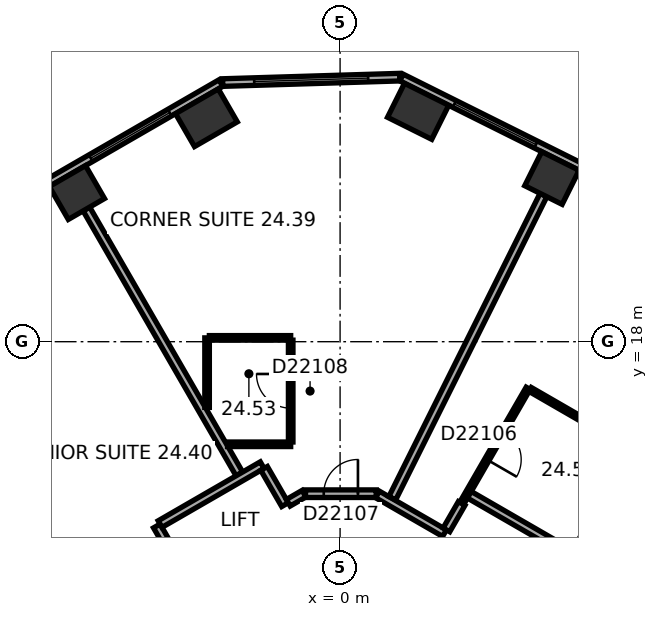
"""IFC4 building model, lengths in metres.
Left out: names, types, materials, properties, quantities, classifications, styles, units other than length and angle.
Written with IfcOpenShell. Run it as: python <this file> out.ifc"""

import sys

from ifc_helpers import new_model, si_unit, direction, frame, frame_2d, origin, origin_2d, place, context, subcontext, project, spatial, rectangle, extrude, element, fill, save


model = new_model("IFC4")
c1 = context("Model", 3, precision=1e-05, world=origin(), true_north=direction((0.0, 1.0)))
c2 = subcontext(c1, "Body", "Model", "MODEL_VIEW")
j1 = project(units=[si_unit("LENGTHUNIT", "METRE"), si_unit("PLANEANGLEUNIT", "RADIAN")], contexts=[c1])
p1 = place(None, origin())
s1 = spatial("IfcSite", under=j1, at=p1, CompositionType="ELEMENT")
p2 = place(p1, origin())
s2 = spatial("IfcBuilding", under=s1, at=p2, CompositionType="ELEMENT")
p3 = place(p2, frame((0.0, 0.0, 103.4)))
s3 = spatial("IfcBuildingStorey", under=s2, at=p3, CompositionType="ELEMENT", Elevation=103.4)
p4 = place(p3, frame((5.574, 22.306, 0.0), z_axis=(0.0, 0.0, 1.0), x_axis=(-0.894934361602, 0.44619781311, 0.0)))
e1 = element("IfcColumn", 1, at=p4, inside=s3, PredefinedType="COLUMN", context=c2, shape_type="SweptSolid", body=[
    extrude(rectangle(XDim=1.1, YDim=1.0, at=origin_2d()), origin(), (0.0, 0.0, 1.0), 3.3),
])
for number, where, z_axis, x_axis in (
    (2, (2.053, 24.062, 0.0), (0.0, 0.0, 1.0), (-0.895, 0.446, 0.0)),
    (3, (-3.518, 23.892, 0.0), (0.0, 0.0, 1.0), (-0.866, -0.5, 0.0)),
):
    element("IfcColumn", number, at=place(p3, frame(where, z_axis=z_axis, x_axis=x_axis)), inside=s3, PredefinedType="COLUMN", context=c2, shape_type="SweptSolid", body=[
        extrude(rectangle(XDim=1.3, YDim=1.0, at=origin_2d()), origin(), (0.0, 0.0, 1.0), 3.3),
    ])
p5 = place(p3, frame((-6.926, 21.925, 0.0), z_axis=(0.0, 0.0, 1.0), x_axis=(-0.866025403784, -0.5, 0.0)))
e4 = element("IfcColumn", 4, at=p5, inside=s3, PredefinedType="COLUMN", context=c2, shape_type="SweptSolid", body=[
    extrude(rectangle(XDim=1.1, YDim=1.0, at=origin_2d()), origin(), (0.0, 0.0, 1.0), 3.3),
])
p6 = place(p3, frame((20.63, 15.47, 0.0), z_axis=(0.0, 0.0, 1.0), x_axis=(-0.894934518609, 0.446197498203, 0.0)))
e5 = element("IfcWall", 5, at=p6, inside=s3, PredefinedType="STANDARD", context=c2, shape_type="SweptSolid", body=[
    extrude(rectangle(XDim=21.246, YDim=0.2, at=frame_2d((10.623, 0.0))), origin(), (0.0, 0.0, 1.0), 3.3),
])
p7 = place(p6, frame((1.553, 0.0, 0.8)))
e6 = element("IfcOpeningElement", 6, at=p7, cuts=e5, PredefinedType="OPENING", context=c2, shape_type="SweptSolid", body=[
    extrude(rectangle(XDim=2.4, YDim=1.7, at=frame_2d((1.2, 0.85))), frame((0.0, 0.11, 0.0), z_axis=(0.0, -1.0, 0.0), x_axis=(1.0, 0.0, 0.0)), (0.0, 0.0, 1.0), 0.22),
])
p8 = place(p6, frame((5.488, 0.0, 0.8)))
e7 = element("IfcOpeningElement", 7, at=p8, cuts=e5, PredefinedType="OPENING", context=c2, shape_type="SweptSolid", body=[
    extrude(rectangle(XDim=2.4, YDim=1.7, at=frame_2d((1.2, 0.85))), frame((0.0, 0.11, 0.0), z_axis=(0.0, -1.0, 0.0), x_axis=(1.0, 0.0, 0.0)), (0.0, 0.0, 1.0), 0.22),
])
p9 = place(p6, frame((9.422, 0.0, 0.8)))
e8 = element("IfcOpeningElement", 8, at=p9, cuts=e5, PredefinedType="OPENING", context=c2, shape_type="SweptSolid", body=[
    extrude(rectangle(XDim=2.4, YDim=1.7, at=frame_2d((1.2, 0.85))), frame((0.0, 0.11, 0.0), z_axis=(0.0, -1.0, 0.0), x_axis=(1.0, 0.0, 0.0)), (0.0, 0.0, 1.0), 0.22),
])
p10 = place(p6, frame((13.357, 0.0, 0.8)))
e9 = element("IfcOpeningElement", 9, at=p10, cuts=e5, PredefinedType="OPENING", context=c2, shape_type="SweptSolid", body=[
    extrude(rectangle(XDim=2.4, YDim=1.7, at=frame_2d((1.2, 0.85))), frame((0.0, 0.11, 0.0), z_axis=(0.0, -1.0, 0.0), x_axis=(1.0, 0.0, 0.0)), (0.0, 0.0, 1.0), 0.22),
])
p11 = place(p6, frame((17.292, 0.0, 0.8)))
e10 = element("IfcOpeningElement", 10, at=p11, cuts=e5, PredefinedType="OPENING", context=c2, shape_type="SweptSolid", body=[
    extrude(rectangle(XDim=2.4, YDim=1.7, at=frame_2d((1.2, 0.85))), frame((0.0, 0.11, 0.0), z_axis=(0.0, -1.0, 0.0), x_axis=(1.0, 0.0, 0.0)), (0.0, 0.0, 1.0), 0.22),
])
p12 = place(p3, frame((1.568, 24.961, 0.0), z_axis=(0.0, 0.0, 1.0), x_axis=(-0.999533359013, -0.030546099927, 0.0)))
e11 = element("IfcWall", 11, at=p12, inside=s3, PredefinedType="STANDARD", context=c2, shape_type="SweptSolid", body=[
    extrude(rectangle(XDim=4.66, YDim=0.2, at=frame_2d((2.33, 0.0))), origin(), (0.0, 0.0, 1.0), 3.3),
])
p13 = place(p12, frame((0.83, 0.0, 0.8)))
e12 = element("IfcOpeningElement", 12, at=p13, cuts=e11, PredefinedType="OPENING", context=c2, shape_type="SweptSolid", body=[
    extrude(rectangle(XDim=3.0, YDim=1.7, at=frame_2d((1.5, 0.85))), frame((0.0, 0.11, 0.0), z_axis=(0.0, -1.0, 0.0), x_axis=(1.0, 0.0, 0.0)), (0.0, 0.0, 1.0), 0.22),
])
p14 = place(p3, frame((-3.136, 24.805, 0.0), z_axis=(0.0, 0.0, 1.0), x_axis=(-0.866028291626, -0.499994998079, 0.0)))
e13 = element("IfcWall", 13, at=p14, inside=s3, PredefinedType="STANDARD", context=c2, shape_type="SweptSolid", body=[
    extrude(rectangle(XDim=21.246, YDim=0.2, at=frame_2d((10.623, 0.0))), origin(), (0.0, 0.0, 1.0), 3.3),
])
p15 = place(p14, frame((1.555, 0.0, 0.8)))
e14 = element("IfcOpeningElement", 14, at=p15, cuts=e13, PredefinedType="OPENING", context=c2, shape_type="SweptSolid", body=[
    extrude(rectangle(XDim=2.4, YDim=1.7, at=frame_2d((1.2, 0.85))), frame((0.0, 0.11, 0.0), z_axis=(0.0, -1.0, 0.0), x_axis=(1.0, 0.0, 0.0)), (0.0, 0.0, 1.0), 0.22),
])
p16 = place(p14, frame((5.489, 0.0, 0.8)))
e15 = element("IfcOpeningElement", 15, at=p16, cuts=e13, PredefinedType="OPENING", context=c2, shape_type="SweptSolid", body=[
    extrude(rectangle(XDim=2.4, YDim=1.7, at=frame_2d((1.2, 0.85))), frame((0.0, 0.11, 0.0), z_axis=(0.0, -1.0, 0.0), x_axis=(1.0, 0.0, 0.0)), (0.0, 0.0, 1.0), 0.22),
])
p17 = place(p14, frame((9.424, 0.0, 0.8)))
e16 = element("IfcOpeningElement", 16, at=p17, cuts=e13, PredefinedType="OPENING", context=c2, shape_type="SweptSolid", body=[
    extrude(rectangle(XDim=2.4, YDim=1.7, at=frame_2d((1.2, 0.85))), frame((0.0, 0.11, 0.0), z_axis=(0.0, -1.0, 0.0), x_axis=(1.0, 0.0, 0.0)), (0.0, 0.0, 1.0), 0.22),
])
p18 = place(p14, frame((13.358, 0.0, 0.8)))
e17 = element("IfcOpeningElement", 17, at=p18, cuts=e13, PredefinedType="OPENING", context=c2, shape_type="SweptSolid", body=[
    extrude(rectangle(XDim=2.4, YDim=1.7, at=frame_2d((1.2, 0.85))), frame((0.0, 0.11, 0.0), z_axis=(0.0, -1.0, 0.0), x_axis=(1.0, 0.0, 0.0)), (0.0, 0.0, 1.0), 0.22),
])
p19 = place(p14, frame((17.293, 0.0, 0.8)))
e18 = element("IfcOpeningElement", 18, at=p19, cuts=e13, PredefinedType="OPENING", context=c2, shape_type="SweptSolid", body=[
    extrude(rectangle(XDim=2.4, YDim=1.7, at=frame_2d((1.2, 0.85))), frame((0.0, 0.11, 0.0), z_axis=(0.0, -1.0, 0.0), x_axis=(1.0, 0.0, 0.0)), (0.0, 0.0, 1.0), 0.22),
])
p20 = place(p3, frame((-7.934, 13.133, 0.0), z_axis=(0.0, 0.0, 1.0), x_axis=(0.499938597367, -0.866060851709, 0.0)))
e19 = element("IfcWall", 19, at=p20, inside=s3, PredefinedType="PARTITIONING", context=c2, shape_type="SweptSolid", body=[
    extrude(rectangle(XDim=2.64, YDim=0.12, at=frame_2d((1.32, 0.0))), origin(), (0.0, 0.0, 1.0), 3.05),
])
p21 = place(p20, frame((0.87, 0.0, 0.0)))
e20 = element("IfcOpeningElement", 20, at=p21, cuts=e19, PredefinedType="OPENING", context=c2, shape_type="SweptSolid", body=[
    extrude(rectangle(XDim=0.9, YDim=2.1, at=frame_2d((0.45, 1.05))), frame((0.0, 0.07, 0.0), z_axis=(0.0, -1.0, 0.0), x_axis=(1.0, 0.0, 0.0)), (0.0, 0.0, 1.0), 0.14),
])
p22 = place(p3, frame((-6.676, 21.492, 0.0), z_axis=(0.0, 0.0, 1.0), x_axis=(0.500011263043, -0.866018900966, 0.0)))
e21 = element("IfcWall", 21, at=p22, inside=s3, PredefinedType="PARTITIONING", context=c2, shape_type="SweptSolid", body=[
    extrude(rectangle(XDim=8.049, YDim=0.2, at=frame_2d((4.024, 0.0))), origin(), (0.0, 0.0, 1.0), 3.05),
])
p23 = place(p3, frame((-4.823, 13.152, 0.0), z_axis=(0.0, 0.0, 1.0), x_axis=(0.499986357472, -0.866033280158, 0.0)))
e22 = element("IfcWall", 22, at=p23, inside=s3, PredefinedType="PARTITIONING", context=c2, shape_type="SweptSolid", body=[
    extrude(rectangle(XDim=1.201, YDim=0.2, at=frame_2d((0.601, 0.0))), origin(), (0.0, 0.0, 1.0), 3.05),
])
p24 = place(p3, frame((-3.5, 16.271, 0.0), z_axis=(0.0, 0.0, 1.0), x_axis=(0.0, 1.0, 0.0)))
e23 = element("IfcWall", 23, at=p24, inside=s3, PredefinedType="PARTITIONING", context=c2, shape_type="SweptSolid", body=[
    extrude(rectangle(XDim=1.829, YDim=0.12, at=frame_2d((0.915, 0.0))), origin(), (0.0, 0.0, 1.0), 3.05),
])
p25 = place(p3, frame((-3.44, 18.101, 0.0), z_axis=(0.0, 0.0, 1.0), x_axis=(1.0, 0.0, 0.0)))
e24 = element("IfcWall", 24, at=p25, inside=s3, PredefinedType="PARTITIONING", context=c2, shape_type="SweptSolid", body=[
    extrude(rectangle(XDim=2.14, YDim=0.12, at=frame_2d((1.07, 0.0))), origin(), (0.0, 0.0, 1.0), 3.05),
])
p26 = place(p3, frame((-2.05, 14.752, 0.0), z_axis=(0.0, 0.0, 1.0), x_axis=(-0.866030936828, -0.499990416364, 0.0)))
e25 = element("IfcWall", 25, at=p26, inside=s3, PredefinedType="PARTITIONING", context=c2, shape_type="SweptSolid", body=[
    extrude(rectangle(XDim=3.102, YDim=0.2, at=frame_2d((1.551, 0.0))), origin(), (0.0, 0.0, 1.0), 3.05),
])
p27 = place(p3, frame((-1.449, 13.712, 0.0), z_axis=(0.0, 0.0, 1.0), x_axis=(-0.499978356969, 0.866037899034, 0.0)))
e26 = element("IfcWall", 26, at=p27, inside=s3, PredefinedType="PARTITIONING", context=c2, shape_type="SweptSolid", body=[
    extrude(rectangle(XDim=1.101, YDim=0.2, at=frame_2d((0.551, 0.0))), origin(), (0.0, 0.0, 1.0), 3.05),
])
p28 = place(p3, frame((-1.3, 15.301, 0.0), z_axis=(0.0, 0.0, 1.0), x_axis=(-1.0, 0.0, 0.0)))
e27 = element("IfcWall", 27, at=p28, inside=s3, PredefinedType="PARTITIONING", context=c2, shape_type="SweptSolid", body=[
    extrude(rectangle(XDim=1.661, YDim=0.12, at=frame_2d((0.831, 0.0))), origin(), (0.0, 0.0, 1.0), 3.05),
])
p29 = place(p3, frame((-1.3, 18.041, 0.0), z_axis=(0.0, 0.0, 1.0), x_axis=(0.0, -1.0, 0.0)))
e28 = element("IfcWall", 28, at=p29, inside=s3, PredefinedType="PARTITIONING", context=c2, shape_type="SweptSolid", body=[
    extrude(rectangle(XDim=2.68, YDim=0.12, at=frame_2d((1.34, 0.0))), origin(), (0.0, 0.0, 1.0), 3.05),
])
p30 = place(p29, frame((0.89, 0.0, 0.0)))
e29 = element("IfcOpeningElement", 29, at=p30, cuts=e28, PredefinedType="OPENING", context=c2, shape_type="SweptSolid", body=[
    extrude(rectangle(XDim=0.9, YDim=2.1, at=frame_2d((0.45, 1.05))), frame((0.0, 0.07, 0.0), z_axis=(0.0, -1.0, 0.0), x_axis=(1.0, 0.0, 0.0)), (0.0, 0.0, 1.0), 0.14),
])
p31 = place(p3, frame((-0.95, 14.001, 0.0), z_axis=(0.0, 0.0, 1.0), x_axis=(-0.86609177584, -0.499885022602, 0.0)))
e30 = element("IfcWall", 30, at=p31, inside=s3, PredefinedType="PARTITIONING", context=c2, shape_type="SweptSolid", body=[
    extrude(rectangle(XDim=0.477, YDim=0.2, at=frame_2d((0.238, 0.0))), origin(), (0.0, 0.0, 1.0), 3.05),
])
p32 = place(p3, frame((0.95, 14.001, 0.0), z_axis=(0.0, 0.0, 1.0), x_axis=(-1.0, 0.0, 0.0)))
e31 = element("IfcWall", 31, at=p32, inside=s3, PredefinedType="PARTITIONING", context=c2, shape_type="SweptSolid", body=[
    extrude(rectangle(XDim=1.86, YDim=0.2, at=frame_2d((0.93, 0.0))), origin(), (0.0, 0.0, 1.0), 3.05),
])
p33 = place(p32, frame((0.48, 0.0, 0.0)))
e32 = element("IfcOpeningElement", 32, at=p33, cuts=e31, PredefinedType="OPENING", context=c2, shape_type="SweptSolid", body=[
    extrude(rectangle(XDim=0.9, YDim=2.1, at=frame_2d((0.45, 1.05))), frame((0.0, 0.11, 0.0), z_axis=(0.0, -1.0, 0.0), x_axis=(1.0, 0.0, 0.0)), (0.0, 0.0, 1.0), 0.22),
])
p34 = place(p3, frame((2.748, 12.962, 0.0), z_axis=(0.0, 0.0, 1.0), x_axis=(-0.866013897511, 0.50001992892, 0.0)))
e33 = element("IfcWall", 33, at=p34, inside=s3, PredefinedType="PARTITIONING", context=c2, shape_type="SweptSolid", body=[
    extrude(rectangle(XDim=2.037, YDim=0.2, at=frame_2d((1.018, 0.0))), origin(), (0.0, 0.0, 1.0), 3.05),
])
p35 = place(p3, frame((3.199, 13.743, 0.0), z_axis=(0.0, 0.0, 1.0), x_axis=(-0.500170954823, -0.865926680471, 0.0)))
e34 = element("IfcWall", 34, at=p35, inside=s3, PredefinedType="PARTITIONING", context=c2, shape_type="SweptSolid", body=[
    extrude(rectangle(XDim=0.801, YDim=0.2, at=frame_2d((0.4, 0.0))), origin(), (0.0, 0.0, 1.0), 3.05),
])
p36 = place(p3, frame((3.232, 13.8, 0.0), z_axis=(0.0, 0.0, 1.0), x_axis=(0.499993265928, 0.866029291668, 0.0)))
e35 = element("IfcWall", 35, at=p36, inside=s3, PredefinedType="PARTITIONING", context=c2, shape_type="SweptSolid", body=[
    extrude(rectangle(XDim=3.434, YDim=0.12, at=frame_2d((1.717, 0.0))), origin(), (0.0, 0.0, 1.0), 3.05),
])
p37 = place(p36, frame((1.267, 0.0, 0.0)))
e36 = element("IfcOpeningElement", 36, at=p37, cuts=e35, PredefinedType="OPENING", context=c2, shape_type="SweptSolid", body=[
    extrude(rectangle(XDim=0.9, YDim=2.1, at=frame_2d((0.45, 1.05))), frame((0.0, 0.07, 0.0), z_axis=(0.0, -1.0, 0.0), x_axis=(1.0, 0.0, 0.0)), (0.0, 0.0, 1.0), 0.14),
])
p38 = place(p3, frame((5.001, 16.744, 0.0), z_axis=(0.0, 0.0, 1.0), x_axis=(0.866009488468, -0.500027565123, 0.0)))
e37 = element("IfcWall", 37, at=p38, inside=s3, PredefinedType="PARTITIONING", context=c2, shape_type="SweptSolid", body=[
    extrude(rectangle(XDim=3.14, YDim=0.12, at=frame_2d((1.57, 0.0))), origin(), (0.0, 0.0, 1.0), 3.05),
])
p39 = place(p3, frame((5.351, 21.859, 0.0), z_axis=(0.0, 0.0, 1.0), x_axis=(-0.446205309328, -0.894930624086, 0.0)))
e38 = element("IfcWall", 38, at=p39, inside=s3, PredefinedType="PARTITIONING", context=c2, shape_type="SweptSolid", body=[
    extrude(rectangle(XDim=8.913, YDim=0.2, at=frame_2d((4.457, 0.0))), origin(), (0.0, 0.0, 1.0), 2.6),
])
p40 = place(p3, frame((7.69, 15.122, 0.0), z_axis=(0.0, 0.0, 1.0), x_axis=(-0.499991248344, -0.866030456496, 0.0)))
e39 = element("IfcWall", 39, at=p40, inside=s3, PredefinedType="PARTITIONING", context=c2, shape_type="SweptSolid", body=[
    extrude(rectangle(XDim=3.04, YDim=0.12, at=frame_2d((1.52, 0.0))), origin(), (0.0, 0.0, 1.0), 3.05),
])
p41 = place(p3, frame((10.885, 9.652, 0.0), z_axis=(0.0, 0.0, 1.0), x_axis=(-0.866033630405, 0.499985750804, 0.0)))
e40 = element("IfcWall", 40, at=p41, inside=s3, PredefinedType="PARTITIONING", context=c2, shape_type="SweptSolid", body=[
    extrude(rectangle(XDim=8.642, YDim=0.2, at=frame_2d((4.321, 0.0))), origin(), (0.0, 0.0, 1.0), 3.05),
])
p42 = place(p41, frame((2.276, 0.0, 0.0)))
e41 = element("IfcOpeningElement", 41, at=p42, cuts=e40, PredefinedType="OPENING", context=c2, shape_type="SweptSolid", body=[
    extrude(rectangle(XDim=0.9, YDim=2.1, at=frame_2d((0.45, 1.05))), frame((0.0, 0.11, 0.0), z_axis=(0.0, -1.0, 0.0), x_axis=(1.0, 0.0, 0.0)), (0.0, 0.0, 1.0), 0.22),
])
p43 = place(p11, origin())
e42 = element("IfcWindow", 42, at=p43, inside=s3, PartitioningType="SINGLE_PANEL", PredefinedType="WINDOW", context=c2, shape_type="SweptSolid", body=[
    extrude(rectangle(XDim=2.4, YDim=1.7, at=frame_2d((1.2, 0.85))), frame((0.0, 0.03, 0.0), z_axis=(0.0, -1.0, 0.0), x_axis=(1.0, 0.0, 0.0)), (0.0, 0.0, 1.0), 0.06),
])
fill(e10, e42)
p44 = place(p13, origin())
e43 = element("IfcWindow", 43, at=p44, inside=s3, PartitioningType="SINGLE_PANEL", PredefinedType="WINDOW", context=c2, shape_type="SweptSolid", body=[
    extrude(rectangle(XDim=3.0, YDim=1.7, at=frame_2d((1.5, 0.85))), frame((0.0, 0.03, 0.0), z_axis=(0.0, -1.0, 0.0), x_axis=(1.0, 0.0, 0.0)), (0.0, 0.0, 1.0), 0.06),
])
fill(e12, e43)
p45 = place(p15, origin())
e44 = element("IfcWindow", 44, at=p45, inside=s3, PartitioningType="SINGLE_PANEL", PredefinedType="WINDOW", context=c2, shape_type="SweptSolid", body=[
    extrude(rectangle(XDim=2.4, YDim=1.7, at=frame_2d((1.2, 0.85))), frame((0.0, 0.03, 0.0), z_axis=(0.0, -1.0, 0.0), x_axis=(1.0, 0.0, 0.0)), (0.0, 0.0, 1.0), 0.06),
])
fill(e14, e44)
p46 = place(p37, origin())
e45 = element("IfcDoor", 45, at=p46, inside=s3, OperationType="SINGLE_SWING_LEFT", PredefinedType="DOOR", context=c2, shape_type="SweptSolid", body=[
    extrude(rectangle(XDim=0.9, YDim=2.1, at=frame_2d((0.45, 1.05))), frame((0.0, 0.025, 0.0), z_axis=(0.0, -1.0, 0.0), x_axis=(1.0, 0.0, 0.0)), (0.0, 0.0, 1.0), 0.05),
])
fill(e36, e45)
p47 = place(p33, origin())
e46 = element("IfcDoor", 46, at=p47, inside=s3, OperationType="SINGLE_SWING_LEFT", PredefinedType="DOOR", context=c2, shape_type="SweptSolid", body=[
    extrude(rectangle(XDim=0.9, YDim=2.1, at=frame_2d((0.45, 1.05))), frame((0.0, 0.025, 0.0), z_axis=(0.0, -1.0, 0.0), x_axis=(1.0, 0.0, 0.0)), (0.0, 0.0, 1.0), 0.05),
])
fill(e32, e46)
p48 = place(p30, origin())
e47 = element("IfcDoor", 47, at=p48, inside=s3, OperationType="SINGLE_SWING_LEFT", PredefinedType="DOOR", context=c2, shape_type="SweptSolid", body=[
    extrude(rectangle(XDim=0.9, YDim=2.1, at=frame_2d((0.45, 1.05))), frame((0.0, 0.025, 0.0), z_axis=(0.0, -1.0, 0.0), x_axis=(1.0, 0.0, 0.0)), (0.0, 0.0, 1.0), 0.05),
])
fill(e29, e47)
save(model, sys.argv[1])
